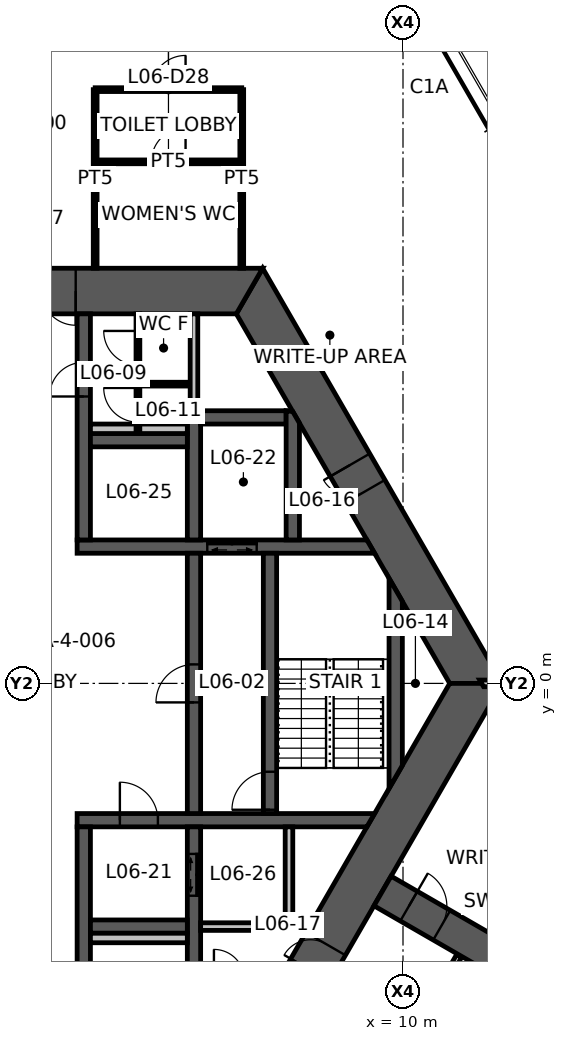
"""IFC4 building model, lengths in metres.
Left out: names, types, materials, properties, quantities, classifications, styles, units other than length and angle.
Written with IfcOpenShell. Run it as: python <this file> out.ifc"""

import sys

from ifc_helpers import new_model, si_unit, direction, frame, frame_2d, origin, place, context, subcontext, project, spatial, polyline, rectangle, outline, extrude, element, fill, save


model = new_model("IFC4")
c1 = context("Model", 3, precision=1e-05, world=origin(), true_north=direction((0.0, 1.0)))
c2 = subcontext(c1, "Body", "Model", "MODEL_VIEW")
j1 = project(units=[si_unit("LENGTHUNIT", "METRE"), si_unit("PLANEANGLEUNIT", "RADIAN")], contexts=[c1])
p1 = place(None, origin())
s1 = spatial("IfcSite", under=j1, at=p1, CompositionType="ELEMENT")
p2 = place(p1, origin())
s2 = spatial("IfcBuilding", under=s1, at=p2, CompositionType="ELEMENT")
p3 = place(p2, frame((0.0, 0.0, 22.6)))
s3 = spatial("IfcBuildingStorey", under=s2, at=p3, CompositionType="ELEMENT", Elevation=22.6)
p4 = place(p3, frame((11.922, 0.0, 0.0), z_axis=(0.0, 0.0, 1.0), x_axis=(-0.500004296715, 0.866022923061, 0.0)))
e1 = element("IfcWall", 1, at=p4, inside=s3, PredefinedType="SHEAR", context=c2, shape_type="SweptSolid", body=[
    extrude(outline(polyline([(-0.346, -0.6), (5.835, -0.6), (6.635, -0.6), (12.269, -0.6), (11.576, 0.6), (6.635, 0.6), (5.835, 0.6), (0.346, 0.6), (-0.346, -0.6)])), origin(), (0.0, 0.0, 1.0), 4.2),
])
p5 = place(p4, frame((5.835, 0.0, 0.0)))
e2 = element("IfcOpeningElement", 2, at=p5, cuts=e1, PredefinedType="OPENING", context=c2, shape_type="SweptSolid", body=[
    extrude(rectangle(XDim=0.8, YDim=2.1, at=frame_2d((0.4, 1.05))), frame((0.0, 0.61, 0.0), z_axis=(0.0, -1.0, 0.0), x_axis=(1.0, 0.0, 0.0)), (0.0, 0.0, 1.0), 1.22),
])
p6 = place(p3, frame((5.961, 10.325, 0.0), z_axis=(0.0, 0.0, 1.0), x_axis=(-1.0, 0.0, 0.0)))
e3 = element("IfcWall", 3, at=p6, inside=s3, PredefinedType="SHEAR", context=c2, shape_type="SweptSolid", body=[
    extrude(outline(polyline([(-0.346, -0.6), (4.574, -0.6), (5.474, -0.6), (6.449, -0.6), (7.349, -0.6), (12.269, -0.6), (11.576, 0.6), (7.349, 0.6), (6.449, 0.6), (5.474, 0.6), (4.574, 0.6), (0.346, 0.6), (-0.346, -0.6)])), origin(), (0.0, 0.0, 1.0), 4.2),
])
p7 = place(p6, frame((6.449, 0.0, 0.0)))
e4 = element("IfcOpeningElement", 4, at=p7, cuts=e3, PredefinedType="OPENING", context=c2, shape_type="SweptSolid", body=[
    extrude(rectangle(XDim=0.9, YDim=2.1, at=frame_2d((0.45, 1.05))), frame((0.0, 0.61, 0.0), z_axis=(0.0, -1.0, 0.0), x_axis=(1.0, 0.0, 0.0)), (0.0, 0.0, 1.0), 1.22),
])
p8 = place(p6, frame((4.574, 0.0, 0.0)))
e5 = element("IfcOpeningElement", 5, at=p8, cuts=e3, PredefinedType="OPENING", context=c2, shape_type="SweptSolid", body=[
    extrude(rectangle(XDim=0.9, YDim=2.1, at=frame_2d((0.45, 1.05))), frame((0.0, 0.61, 0.0), z_axis=(0.0, -1.0, 0.0), x_axis=(1.0, 0.0, 0.0)), (0.0, 0.0, 1.0), 1.22),
])
p9 = place(p3, frame((5.961, -10.325, 0.0), z_axis=(0.0, 0.0, 1.0), x_axis=(0.500004296715, 0.866022923061, 0.0)))
e6 = element("IfcWall", 6, at=p9, inside=s3, PredefinedType="SHEAR", context=c2, shape_type="SweptSolid", body=[
    extrude(outline(polyline([(-0.346, -0.6), (3.208, -0.6), (4.009, -0.6), (12.269, -0.6), (11.576, 0.6), (4.009, 0.6), (3.208, 0.6), (0.346, 0.6), (-0.346, -0.6)])), origin(), (0.0, 0.0, 1.0), 4.2),
])
p10 = place(p9, frame((3.208, 0.0, 0.0)))
e7 = element("IfcOpeningElement", 7, at=p10, cuts=e6, PredefinedType="OPENING", context=c2, shape_type="SweptSolid", body=[
    extrude(rectangle(XDim=0.8, YDim=2.1, at=frame_2d((0.4, 1.05))), frame((0.0, 0.61, 0.0), z_axis=(0.0, -1.0, 0.0), x_axis=(1.0, 0.0, 0.0)), (0.0, 0.0, 1.0), 1.22),
])
p11 = place(p3, frame((9.461, -5.462, 0.0), z_axis=(0.0, 0.0, 1.0), x_axis=(0.866019116917, -0.500010889016, 0.0)))
e8 = element("IfcWall", 8, at=p11, inside=s3, PredefinedType="SHEAR", context=c2, shape_type="SweptSolid", body=[
    extrude(rectangle(XDim=7.595, YDim=0.9, at=frame_2d((3.798, 0.0))), origin(), (0.0, 0.0, 1.0), 4.2),
])
p12 = place(p11, frame((0.8, 0.0, 0.0)))
e9 = element("IfcOpeningElement", 9, at=p12, cuts=e8, PredefinedType="OPENING", context=c2, shape_type="SweptSolid", body=[
    extrude(rectangle(XDim=1.0, YDim=2.1, at=frame_2d((0.5, 1.05))), frame((0.0, 0.46, 0.0), z_axis=(0.0, -1.0, 0.0), x_axis=(1.0, 0.0, 0.0)), (0.0, 0.0, 1.0), 0.92),
])
p13 = place(p3, frame((1.425, 3.6, 0.0), z_axis=(0.0, 0.0, 1.0), x_axis=(1.0, 0.0, 0.0)))
e10 = element("IfcWall", 10, at=p13, inside=s3, PredefinedType="SHEAR", context=c2, shape_type="SweptSolid", body=[
    extrude(outline(polyline([(0.0, -0.175), (3.425, -0.175), (4.725, -0.175), (7.827, -0.175), (7.625, 0.175), (4.725, 0.175), (3.425, 0.175), (0.0, 0.175), (0.0, -0.175)])), origin(), (0.0, 0.0, 1.0), 4.2),
])
p14 = place(p13, frame((3.425, 0.0, 0.0)))
e11 = element("IfcOpeningElement", 11, at=p14, cuts=e10, PredefinedType="OPENING", context=c2, shape_type="SweptSolid", body=[
    extrude(rectangle(XDim=1.3, YDim=2.1, at=frame_2d((0.65, 1.05))), frame((0.0, 0.185, 0.0), z_axis=(0.0, -1.0, 0.0), x_axis=(1.0, 0.0, 0.0)), (0.0, 0.0, 1.0), 0.37),
])
p15 = place(p3, frame((1.425, -3.6, 0.0), z_axis=(0.0, 0.0, 1.0), x_axis=(1.0, 0.0, 0.0)))
e12 = element("IfcWall", 12, at=p15, inside=s3, PredefinedType="SHEAR", context=c2, shape_type="SweptSolid", body=[
    extrude(outline(polyline([(0.0, -0.175), (1.125, -0.175), (2.125, -0.175), (7.625, -0.175), (7.827, 0.175), (2.125, 0.175), (1.125, 0.175), (0.0, 0.175), (0.0, -0.175)])), origin(), (0.0, 0.0, 1.0), 4.2),
])
p16 = place(p15, frame((1.125, 0.0, 0.0)))
e13 = element("IfcOpeningElement", 13, at=p16, cuts=e12, PredefinedType="OPENING", context=c2, shape_type="SweptSolid", body=[
    extrude(rectangle(XDim=1.0, YDim=2.1, at=frame_2d((0.5, 1.05))), frame((0.0, 0.185, 0.0), z_axis=(0.0, -1.0, 0.0), x_axis=(1.0, 0.0, 0.0)), (0.0, 0.0, 1.0), 0.37),
])
p17 = place(p3, frame((1.6, 3.775, 0.0), z_axis=(0.0, 0.0, 1.0), x_axis=(0.0, 1.0, 0.0)))
e14 = element("IfcWall", 14, at=p17, inside=s3, PredefinedType="SHEAR", context=c2, shape_type="SweptSolid", body=[
    extrude(rectangle(XDim=5.95, YDim=0.35, at=frame_2d((2.975, 0.0))), origin(), (0.0, 0.0, 1.0), 4.2),
])
p18 = place(p17, frame((3.775, 0.0, 0.0)))
e15 = element("IfcOpeningElement", 15, at=p18, cuts=e14, PredefinedType="OPENING", context=c2, shape_type="SweptSolid", body=[
    extrude(rectangle(XDim=0.9, YDim=2.1, at=frame_2d((0.45, 1.05))), frame((0.0, 0.185, 0.0), z_axis=(0.0, -1.0, 0.0), x_axis=(1.0, 0.0, 0.0)), (0.0, 0.0, 1.0), 0.37),
])
p19 = place(p3, frame((1.6, -3.775, 0.0), z_axis=(0.0, 0.0, 1.0), x_axis=(0.0, -1.0, 0.0)))
e16 = element("IfcWall", 16, at=p19, inside=s3, PredefinedType="SHEAR", context=c2, shape_type="SweptSolid", body=[
    extrude(rectangle(XDim=5.95, YDim=0.35, at=frame_2d((2.975, 0.0))), origin(), (0.0, 0.0, 1.0), 4.2),
])
p20 = place(p19, frame((3.625, 0.0, 0.0)))
e17 = element("IfcOpeningElement", 17, at=p20, cuts=e16, PredefinedType="OPENING", context=c2, shape_type="SweptSolid", body=[
    extrude(rectangle(XDim=1.2, YDim=2.1, at=frame_2d((0.6, 1.05))), frame((0.0, 0.185, 0.0), z_axis=(0.0, -1.0, 0.0), x_axis=(1.0, 0.0, 0.0)), (0.0, 0.0, 1.0), 0.37),
])
p21 = place(p3, frame((4.5, -3.425, 0.0), z_axis=(0.0, 0.0, 1.0), x_axis=(0.0, 1.0, 0.0)))
e18 = element("IfcWall", 18, at=p21, inside=s3, PredefinedType="SHEAR", context=c2, shape_type="SweptSolid", body=[
    extrude(rectangle(XDim=6.85, YDim=0.35, at=frame_2d((3.425, 0.0))), origin(), (0.0, 0.0, 1.0), 4.2),
])
p22 = place(p21, frame((2.925, 0.0, 0.0)))
e19 = element("IfcOpeningElement", 19, at=p22, cuts=e18, PredefinedType="OPENING", context=c2, shape_type="SweptSolid", body=[
    extrude(rectangle(XDim=1.0, YDim=2.1, at=frame_2d((0.5, 1.05))), frame((0.0, 0.185, 0.0), z_axis=(0.0, -1.0, 0.0), x_axis=(1.0, 0.0, 0.0)), (0.0, 0.0, 1.0), 0.37),
])
p23 = place(p3, frame((6.5, -3.425, 0.0), z_axis=(0.0, 0.0, 1.0), x_axis=(0.0, 1.0, 0.0)))
e20 = element("IfcWall", 20, at=p23, inside=s3, PredefinedType="SHEAR", context=c2, shape_type="SweptSolid", body=[
    extrude(rectangle(XDim=6.85, YDim=0.35, at=frame_2d((3.425, 0.0))), origin(), (0.0, 0.0, 1.0), 4.2),
])
p24 = place(p23, frame((0.1, 0.0, 0.0)))
e21 = element("IfcOpeningElement", 21, at=p24, cuts=e20, PredefinedType="OPENING", context=c2, shape_type="SweptSolid", body=[
    extrude(rectangle(XDim=1.0, YDim=2.1, at=frame_2d((0.5, 1.05))), frame((0.0, 0.185, 0.0), z_axis=(0.0, -1.0, 0.0), x_axis=(1.0, 0.0, 0.0)), (0.0, 0.0, 1.0), 0.37),
])
p25 = place(p3, frame((4.5, 3.775, 0.0), z_axis=(0.0, 0.0, 1.0), x_axis=(0.0, 1.0, 0.0)))
e22 = element("IfcWall", 22, at=p25, inside=s3, PredefinedType="SHEAR", context=c2, shape_type="SweptSolid", body=[
    extrude(rectangle(XDim=3.4, YDim=0.35, at=frame_2d((1.7, 0.0))), origin(), (0.0, 0.0, 1.0), 4.2),
])
p26 = place(p3, frame((4.5, -3.775, 0.0), z_axis=(0.0, 0.0, 1.0), x_axis=(0.0, -1.0, 0.0)))
e23 = element("IfcWall", 23, at=p26, inside=s3, PredefinedType="SHEAR", context=c2, shape_type="SweptSolid", body=[
    extrude(rectangle(XDim=5.95, YDim=0.35, at=frame_2d((2.975, 0.0))), origin(), (0.0, 0.0, 1.0), 4.2),
])
p27 = place(p26, frame((0.712, 0.0, 0.0)))
e24 = element("IfcOpeningElement", 24, at=p27, cuts=e23, PredefinedType="OPENING", context=c2, shape_type="SweptSolid", body=[
    extrude(rectangle(XDim=1.1, YDim=2.1, at=frame_2d((0.55, 1.05))), frame((0.0, 0.185, 0.0), z_axis=(0.0, -1.0, 0.0), x_axis=(1.0, 0.0, 0.0)), (0.0, 0.0, 1.0), 0.37),
])
for number, where, z_axis, x_axis in (
    (25, (1.775, 6.4, 0.0), (0.0, 0.0, 1.0), (1.0, 0.0, 0.0)),
    (26, (1.775, -6.4, 0.0), (0.0, 0.0, 1.0), (1.0, 0.0, 0.0)),
):
    element("IfcWall", number, at=place(p3, frame(where, z_axis=z_axis, x_axis=x_axis)), inside=s3, PredefinedType="SHEAR", context=c2, shape_type="SweptSolid", body=[
        extrude(rectangle(XDim=2.55, YDim=0.35, at=frame_2d((1.275, 0.0))), origin(), (0.0, 0.0, 1.0), 4.2),
    ])
p28 = place(p3, frame((4.675, 7.0, 0.0), z_axis=(0.0, 0.0, 1.0), x_axis=(1.0, 0.0, 0.0)))
e27 = element("IfcWall", 27, at=p28, inside=s3, PredefinedType="SHEAR", context=c2, shape_type="SweptSolid", body=[
    extrude(rectangle(XDim=2.25, YDim=0.35, at=frame_2d((1.125, 0.0))), origin(), (0.0, 0.0, 1.0), 4.2),
])
p29 = place(p3, frame((7.1, 3.775, 0.0), z_axis=(0.0, 0.0, 1.0), x_axis=(0.0, 1.0, 0.0)))
e28 = element("IfcWall", 28, at=p29, inside=s3, PredefinedType="SHEAR", context=c2, shape_type="SweptSolid", body=[
    extrude(outline(polyline([(0.0, -0.175), (3.074, -0.175), (3.377, 0.0), (3.4, 0.175), (0.0, 0.175), (0.0, -0.175)])), origin(), (0.0, 0.0, 1.0), 4.2),
])
p30 = place(p3, frame((9.808, -2.462, 0.0), z_axis=(0.0, 0.0, 1.0), x_axis=(0.0, 1.0, 0.0)))
e29 = element("IfcWall", 29, at=p30, inside=s3, PredefinedType="SHEAR", context=c2, shape_type="SweptSolid", body=[
    extrude(outline(polyline([(0.303, -0.175), (4.621, -0.175), (5.228, 0.175), (-0.303, 0.175), (0.303, -0.175)])), origin(), (0.0, 0.0, 1.0), 4.2),
])
p31 = place(p3, frame((4.5, 7.175, 0.0), z_axis=(0.0, 0.0, 1.0), x_axis=(0.0, 1.0, 0.0)))
e30 = element("IfcWall", 30, at=p31, inside=s3, PredefinedType="STANDARD", context=c2, shape_type="SweptSolid", body=[
    extrude(rectangle(XDim=2.55, YDim=0.2, at=frame_2d((1.275, 0.0))), origin(), (0.0, 0.0, 1.0), 4.2),
])
p32 = place(p3, frame((4.675, -6.4, 0.0), z_axis=(0.0, 0.0, 1.0), x_axis=(1.0, 0.0, 0.0)))
e31 = element("IfcWall", 31, at=p32, inside=s3, PredefinedType="STANDARD", context=c2, shape_type="SweptSolid", body=[
    extrude(rectangle(XDim=2.425, YDim=0.2, at=frame_2d((1.212, 0.0))), origin(), (0.0, 0.0, 1.0), 4.2),
])
p33 = place(p3, frame((7.0, -3.775, 0.0), z_axis=(0.0, 0.0, 1.0), x_axis=(0.0, -1.0, 0.0)))
e32 = element("IfcWall", 32, at=p33, inside=s3, PredefinedType="STANDARD", context=c2, shape_type="SweptSolid", body=[
    extrude(rectangle(XDim=2.525, YDim=0.2, at=frame_2d((1.263, 0.0))), origin(), (0.0, 0.0, 1.0), 4.2),
])
for number, where, z_axis, x_axis in (
    (33, (1.775, 6.7, 0.0), (0.0, 0.0, 1.0), (1.0, 0.0, 0.0)),
    (34, (1.775, -6.7, 0.0), (0.0, 0.0, 1.0), (1.0, 0.0, 0.0)),
):
    element("IfcWall", number, at=place(p3, frame(where, z_axis=z_axis, x_axis=x_axis)), inside=s3, PredefinedType="PLUMBINGWALL", context=c2, shape_type="SweptSolid", body=[
        extrude(rectangle(XDim=2.55, YDim=0.25, at=frame_2d((1.275, 0.0))), origin(), (0.0, 0.0, 1.0), 4.2),
    ])
p34 = place(p3, frame((3.025, 6.575, 0.0), z_axis=(0.0, 0.0, 1.0), x_axis=(0.0, 1.0, 0.0)))
e35 = element("IfcWall", 35, at=p34, inside=s3, PredefinedType="PARTITIONING", context=c2, shape_type="SweptSolid", body=[
    extrude(rectangle(XDim=3.15, YDim=0.1, at=frame_2d((1.575, 0.0))), origin(), (0.0, 0.0, 1.0), 3.2),
])
p35 = place(p34, frame((1.8, 0.0, 0.0)))
e36 = element("IfcOpeningElement", 36, at=p35, cuts=e35, PredefinedType="OPENING", context=c2, shape_type="SweptSolid", body=[
    extrude(rectangle(XDim=0.9, YDim=2.1, at=frame_2d((0.45, 1.05))), frame((0.0, 0.06, 0.0), z_axis=(0.0, -1.0, 0.0), x_axis=(1.0, 0.0, 0.0)), (0.0, 0.0, 1.0), 0.12),
])
p36 = place(p34, frame((0.3, 0.0, 0.0)))
e37 = element("IfcOpeningElement", 37, at=p36, cuts=e35, PredefinedType="OPENING", context=c2, shape_type="SweptSolid", body=[
    extrude(rectangle(XDim=0.9, YDim=2.1, at=frame_2d((0.45, 1.05))), frame((0.0, 0.06, 0.0), z_axis=(0.0, -1.0, 0.0), x_axis=(1.0, 0.0, 0.0)), (0.0, 0.0, 1.0), 0.12),
])
p37 = place(p3, frame((3.075, 7.875, 0.0), z_axis=(0.0, 0.0, 1.0), x_axis=(1.0, 0.0, 0.0)))
e38 = element("IfcWall", 38, at=p37, inside=s3, PredefinedType="PARTITIONING", context=c2, shape_type="SweptSolid", body=[
    extrude(rectangle(XDim=1.25, YDim=0.1, at=frame_2d((0.625, 0.0))), origin(), (0.0, 0.0, 1.0), 3.2),
])
p38 = place(p3, frame((12.07, 0.0, 0.0), z_axis=(0.0, 0.0, 1.0), x_axis=(1.0, 0.0, 0.0)))
e39 = element("IfcWall", 39, at=p38, inside=s3, PredefinedType="PARTITIONING", context=c2, shape_type="SweptSolid", body=[
    extrude(outline(polyline([(0.051, -0.087), (1.129, -0.087), (2.129, -0.087), (7.93, -0.087), (7.93, 0.087), (2.129, 0.087), (1.129, 0.087), (-0.051, 0.087), (0.051, -0.087)])), origin(), (0.0, 0.0, 1.0), 3.3),
])
p39 = place(p38, frame((1.129, 0.0, 0.0)))
e40 = element("IfcOpeningElement", 40, at=p39, cuts=e39, PredefinedType="OPENING", context=c2, shape_type="SweptSolid", body=[
    extrude(rectangle(XDim=1.0, YDim=2.1, at=frame_2d((0.5, 1.05))), frame((0.0, 0.098, 0.0), z_axis=(0.0, -1.0, 0.0), x_axis=(1.0, 0.0, 0.0)), (0.0, 0.0, 1.0), 0.195),
])
p40 = place(p3, frame((1.9, 13.725, 0.0), z_axis=(0.0, 0.0, 1.0), x_axis=(1.0, 0.0, 0.0)))
e41 = element("IfcWall", 41, at=p40, inside=s3, PredefinedType="PARTITIONING", context=c2, shape_type="SweptSolid", body=[
    extrude(rectangle(XDim=3.857, YDim=0.1, at=frame_2d((1.929, 0.0))), origin(), (0.0, 0.0, 1.0), 3.2),
])
p41 = place(p40, frame((1.479, 0.0, 0.0)))
e42 = element("IfcOpeningElement", 42, at=p41, cuts=e41, PredefinedType="OPENING", context=c2, shape_type="SweptSolid", body=[
    extrude(rectangle(XDim=0.9, YDim=2.1, at=frame_2d((0.45, 1.05))), frame((0.0, 0.06, 0.0), z_axis=(0.0, -1.0, 0.0), x_axis=(1.0, 0.0, 0.0)), (0.0, 0.0, 1.0), 0.12),
])
p42 = place(p3, frame((1.9, 15.625, 0.0), z_axis=(0.0, 0.0, 1.0), x_axis=(1.0, 0.0, 0.0)))
e43 = element("IfcWall", 43, at=p42, inside=s3, PredefinedType="PARTITIONING", context=c2, shape_type="SweptSolid", body=[
    extrude(rectangle(XDim=3.857, YDim=0.1, at=frame_2d((1.929, 0.0))), origin(), (0.0, 0.0, 1.0), 3.2),
])
p43 = place(p42, frame((1.479, 0.0, 0.0)))
e44 = element("IfcOpeningElement", 44, at=p43, cuts=e43, PredefinedType="OPENING", context=c2, shape_type="SweptSolid", body=[
    extrude(rectangle(XDim=0.9, YDim=2.1, at=frame_2d((0.45, 1.05))), frame((0.0, 0.06, 0.0), z_axis=(0.0, -1.0, 0.0), x_axis=(1.0, 0.0, 0.0)), (0.0, 0.0, 1.0), 0.12),
])
for number, where, z_axis, x_axis in (
    (45, (1.9, 10.925, 0.0), (0.0, 0.0, 1.0), (0.0, 1.0, 0.0)),
    (46, (5.757, 10.925, 0.0), (0.0, 0.0, 1.0), (0.0, 1.0, 0.0)),
):
    element("IfcWall", number, at=place(p3, frame(where, z_axis=z_axis, x_axis=x_axis)), inside=s3, PredefinedType="PARTITIONING", context=c2, shape_type="SweptSolid", body=[
        extrude(rectangle(XDim=4.7, YDim=0.1, at=frame_2d((2.35, 0.0))), origin(), (0.0, 0.0, 1.0), 3.2),
    ])
p44 = place(p3, frame((11.478, -7.169, 0.0), z_axis=(0.0, 0.0, 1.0), x_axis=(-0.500010424145, -0.866019385318, 0.0)))
e47 = element("IfcWall", 47, at=p44, inside=s3, PredefinedType="PARTITIONING", context=c2, shape_type="SweptSolid", body=[
    extrude(rectangle(XDim=7.339, YDim=0.15, at=frame_2d((3.669, 0.0))), origin(), (0.0, 0.0, 1.0), 3.2),
])
p45 = place(p44, frame((3.169, 0.0, 0.0)))
e48 = element("IfcOpeningElement", 48, at=p45, cuts=e47, PredefinedType="OPENING", context=c2, shape_type="SweptSolid", body=[
    extrude(rectangle(XDim=1.0, YDim=2.1, at=frame_2d((0.5, 1.05))), frame((0.0, 0.085, 0.0), z_axis=(0.0, -1.0, 0.0), x_axis=(1.0, 0.0, 0.0)), (0.0, 0.0, 1.0), 0.17),
])
p46 = place(p8, origin())
e49 = element("IfcDoor", 49, at=p46, inside=s3, OperationType="SINGLE_SWING_LEFT", PredefinedType="DOOR", context=c2, shape_type="SweptSolid", body=[
    extrude(rectangle(XDim=0.9, YDim=2.1, at=frame_2d((0.45, 1.05))), frame((0.0, 0.025, 0.0), z_axis=(0.0, -1.0, 0.0), x_axis=(1.0, 0.0, 0.0)), (0.0, 0.0, 1.0), 0.05),
])
fill(e5, e49)
p47 = place(p5, origin())
e50 = element("IfcDoor", 50, at=p47, inside=s3, OperationType="SINGLE_SWING_RIGHT", PredefinedType="DOOR", context=c2, shape_type="SweptSolid", body=[
    extrude(rectangle(XDim=0.8, YDim=2.1, at=frame_2d((0.4, 1.05))), frame((0.0, 0.025, 0.0), z_axis=(0.0, -1.0, 0.0), x_axis=(1.0, 0.0, 0.0)), (0.0, 0.0, 1.0), 0.05),
])
fill(e2, e50)
p48 = place(p10, origin())
e51 = element("IfcDoor", 51, at=p48, inside=s3, OperationType="SINGLE_SWING_LEFT", PredefinedType="DOOR", context=c2, shape_type="SweptSolid", body=[
    extrude(rectangle(XDim=0.8, YDim=2.1, at=frame_2d((0.4, 1.05))), frame((0.0, 0.025, 0.0), z_axis=(0.0, -1.0, 0.0), x_axis=(1.0, 0.0, 0.0)), (0.0, 0.0, 1.0), 0.05),
])
fill(e7, e51)
p49 = place(p22, origin())
e52 = element("IfcDoor", 52, at=p49, inside=s3, OperationType="SINGLE_SWING_LEFT", PredefinedType="DOOR", context=c2, shape_type="SweptSolid", body=[
    extrude(rectangle(XDim=1.0, YDim=2.1, at=frame_2d((0.5, 1.05))), frame((0.0, 0.025, 0.0), z_axis=(0.0, -1.0, 0.0), x_axis=(1.0, 0.0, 0.0)), (0.0, 0.0, 1.0), 0.05),
])
fill(e19, e52)
p50 = place(p24, origin())
e53 = element("IfcDoor", 53, at=p50, inside=s3, OperationType="SINGLE_SWING_LEFT", PredefinedType="DOOR", context=c2, shape_type="SweptSolid", body=[
    extrude(rectangle(XDim=1.0, YDim=2.1, at=frame_2d((0.5, 1.05))), frame((0.0, 0.025, 0.0), z_axis=(0.0, -1.0, 0.0), x_axis=(1.0, 0.0, 0.0)), (0.0, 0.0, 1.0), 0.05),
])
fill(e21, e53)
p51 = place(p18, origin())
e54 = element("IfcDoor", 54, at=p51, inside=s3, OperationType="SINGLE_SWING_LEFT", PredefinedType="DOOR", context=c2, shape_type="SweptSolid", body=[
    extrude(rectangle(XDim=0.9, YDim=2.1, at=frame_2d((0.45, 1.05))), frame((0.0, 0.025, 0.0), z_axis=(0.0, -1.0, 0.0), x_axis=(1.0, 0.0, 0.0)), (0.0, 0.0, 1.0), 0.05),
])
fill(e15, e54)
p52 = place(p16, origin())
e55 = element("IfcDoor", 55, at=p52, inside=s3, OperationType="SINGLE_SWING_LEFT", PredefinedType="DOOR", context=c2, shape_type="SweptSolid", body=[
    extrude(rectangle(XDim=1.0, YDim=2.1, at=frame_2d((0.5, 1.05))), frame((0.0, 0.025, 0.0), z_axis=(0.0, -1.0, 0.0), x_axis=(1.0, 0.0, 0.0)), (0.0, 0.0, 1.0), 0.05),
])
fill(e13, e55)
p53 = place(p12, origin())
e56 = element("IfcDoor", 56, at=p53, inside=s3, OperationType="SINGLE_SWING_LEFT", PredefinedType="DOOR", context=c2, shape_type="SweptSolid", body=[
    extrude(rectangle(XDim=1.0, YDim=2.1, at=frame_2d((0.5, 1.05))), frame((0.0, 0.025, 0.0), z_axis=(0.0, -1.0, 0.0), x_axis=(1.0, 0.0, 0.0)), (0.0, 0.0, 1.0), 0.05),
])
fill(e9, e56)
p54 = place(p35, origin())
e57 = element("IfcDoor", 57, at=p54, inside=s3, OperationType="SINGLE_SWING_RIGHT", PredefinedType="DOOR", context=c2, shape_type="SweptSolid", body=[
    extrude(rectangle(XDim=0.9, YDim=2.1, at=frame_2d((0.45, 1.05))), frame((0.0, 0.025, 0.0), z_axis=(0.0, -1.0, 0.0), x_axis=(1.0, 0.0, 0.0)), (0.0, 0.0, 1.0), 0.05),
])
fill(e36, e57)
p55 = place(p36, origin())
e58 = element("IfcDoor", 58, at=p55, inside=s3, OperationType="SINGLE_SWING_RIGHT", PredefinedType="DOOR", context=c2, shape_type="SweptSolid", body=[
    extrude(rectangle(XDim=0.9, YDim=2.1, at=frame_2d((0.45, 1.05))), frame((0.0, 0.025, 0.0), z_axis=(0.0, -1.0, 0.0), x_axis=(1.0, 0.0, 0.0)), (0.0, 0.0, 1.0), 0.05),
])
fill(e37, e58)
p56 = place(p41, origin())
e59 = element("IfcDoor", 59, at=p56, inside=s3, OperationType="SINGLE_SWING_RIGHT", PredefinedType="DOOR", context=c2, shape_type="SweptSolid", body=[
    extrude(rectangle(XDim=0.9, YDim=2.1, at=frame_2d((0.45, 1.05))), frame((0.0, 0.025, 0.0), z_axis=(0.0, -1.0, 0.0), x_axis=(1.0, 0.0, 0.0)), (0.0, 0.0, 1.0), 0.05),
])
fill(e42, e59)
p57 = place(p43, origin())
e60 = element("IfcDoor", 60, at=p57, inside=s3, OperationType="SINGLE_SWING_RIGHT", PredefinedType="DOOR", context=c2, shape_type="SweptSolid", body=[
    extrude(rectangle(XDim=0.9, YDim=2.1, at=frame_2d((0.45, 1.05))), frame((0.0, 0.025, 0.0), z_axis=(0.0, -1.0, 0.0), x_axis=(1.0, 0.0, 0.0)), (0.0, 0.0, 1.0), 0.05),
])
fill(e44, e60)
p58 = place(p27, origin())
e61 = element("IfcDoor", 61, at=p58, inside=s3, OperationType="DOUBLE_DOOR_SLIDING", PredefinedType="DOOR", context=c2, shape_type="SweptSolid", body=[
    extrude(rectangle(XDim=1.1, YDim=2.1, at=frame_2d((0.55, 1.05))), frame((0.0, 0.025, 0.0), z_axis=(0.0, -1.0, 0.0), x_axis=(1.0, 0.0, 0.0)), (0.0, 0.0, 1.0), 0.05),
])
fill(e24, e61)
p59 = place(p14, origin())
e62 = element("IfcDoor", 62, at=p59, inside=s3, OperationType="DOUBLE_DOOR_SLIDING", PredefinedType="DOOR", context=c2, shape_type="SweptSolid", body=[
    extrude(rectangle(XDim=1.3, YDim=2.1, at=frame_2d((0.65, 1.05))), frame((0.0, 0.025, 0.0), z_axis=(0.0, -1.0, 0.0), x_axis=(1.0, 0.0, 0.0)), (0.0, 0.0, 1.0), 0.05),
])
fill(e11, e62)
save(model, sys.argv[1])
